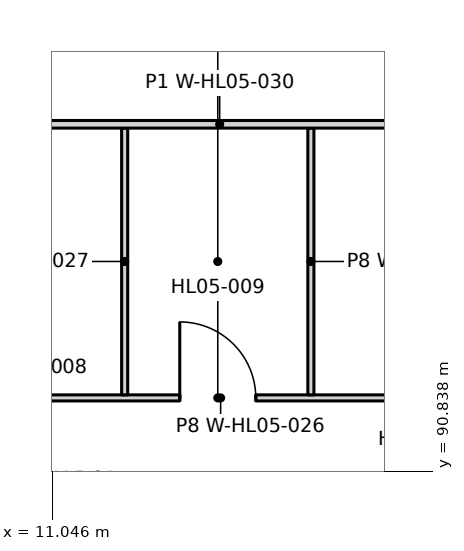
"""IFC4 building model, lengths in metres.
Left out: names, types, materials, properties, quantities, classifications, styles, units other than length and angle.
Written with IfcOpenShell. Run it as: python <this file> out.ifc"""

import sys

from ifc_helpers import new_model, si_unit, direction, frame, frame_2d, origin, place, context, subcontext, project, spatial, rectangle, extrude, element, fill, save


model = new_model("IFC4")
c1 = context("Model", 3, precision=1e-05, world=origin(), true_north=direction((0.0, 1.0)))
c2 = subcontext(c1, "Body", "Model", "MODEL_VIEW")
j1 = project(units=[si_unit("LENGTHUNIT", "METRE"), si_unit("PLANEANGLEUNIT", "RADIAN")], contexts=[c1])
p1 = place(None, origin())
s1 = spatial("IfcSite", under=j1, at=p1, CompositionType="ELEMENT")
p2 = place(p1, origin())
s2 = spatial("IfcBuilding", under=s1, at=p2, CompositionType="ELEMENT")
p3 = place(p2, frame((0.0, 0.0, 24.0)))
s3 = spatial("IfcBuildingStorey", under=s2, at=p3, CompositionType="ELEMENT", Elevation=24.0)
p4 = place(p3, frame((9.05, 91.8, 0.0), z_axis=(0.0, 0.0, 1.0), x_axis=(1.0, 0.0, 0.0)))
e1 = element("IfcWall", 1, at=p4, inside=s3, PredefinedType="PARTITIONING", context=c2, shape_type="SweptSolid", body=[
    extrude(rectangle(XDim=8.425, YDim=0.08, at=frame_2d((4.212, 0.0))), origin(), (0.0, 0.0, 1.0), 4.2),
])
p5 = place(p4, frame((0.95, 0.0, 0.0)))
e2 = element("IfcOpeningElement", 2, at=p5, cuts=e1, PredefinedType="OPENING", context=c2, shape_type="SweptSolid", body=[
    extrude(rectangle(XDim=1.0, YDim=2.1, at=frame_2d((0.5, 1.05))), frame((0.0, 0.05, 0.0), z_axis=(0.0, -1.0, 0.0), x_axis=(1.0, 0.0, 0.0)), (0.0, 0.0, 1.0), 0.1),
])
p6 = place(p4, frame((3.675, 0.0, 0.0)))
e3 = element("IfcOpeningElement", 3, at=p6, cuts=e1, PredefinedType="OPENING", context=c2, shape_type="SweptSolid", body=[
    extrude(rectangle(XDim=1.0, YDim=2.1, at=frame_2d((0.5, 1.05))), frame((0.0, 0.05, 0.0), z_axis=(0.0, -1.0, 0.0), x_axis=(1.0, 0.0, 0.0)), (0.0, 0.0, 1.0), 0.1),
])
p7 = place(p4, frame((6.4, 0.0, 0.0)))
e4 = element("IfcOpeningElement", 4, at=p7, cuts=e1, PredefinedType="OPENING", context=c2, shape_type="SweptSolid", body=[
    extrude(rectangle(XDim=1.0, YDim=2.1, at=frame_2d((0.5, 1.05))), frame((0.0, 0.05, 0.0), z_axis=(0.0, -1.0, 0.0), x_axis=(1.0, 0.0, 0.0)), (0.0, 0.0, 1.0), 0.1),
])
for number, where, z_axis, x_axis in (
    (5, (12.0, 91.84, 0.0), (0.0, 0.0, 1.0), (0.0, 1.0, 0.0)),
    (6, (14.45, 91.84, 0.0), (0.0, 0.0, 1.0), (0.0, 1.0, 0.0)),
):
    element("IfcWall", number, at=place(p3, frame(where, z_axis=z_axis, x_axis=x_axis)), inside=s3, PredefinedType="PARTITIONING", context=c2, shape_type="SweptSolid", body=[
        extrude(rectangle(XDim=3.51, YDim=0.08, at=frame_2d((1.755, 0.0))), origin(), (0.0, 0.0, 1.0), 4.2),
    ])
p8 = place(p3, frame((8.95, 95.4, 0.0), z_axis=(0.0, 0.0, 1.0), x_axis=(1.0, 0.0, 0.0)))
e7 = element("IfcWall", 7, at=p8, inside=s3, PredefinedType="PARTITIONING", context=c2, shape_type="SweptSolid", body=[
    extrude(rectangle(XDim=8.6, YDim=0.1, at=frame_2d((4.3, 0.0))), origin(), (0.0, 0.0, 1.0), 4.2),
])
p9 = place(p6, origin())
e8 = element("IfcDoor", 8, at=p9, inside=s3, OperationType="SINGLE_SWING_LEFT", PredefinedType="DOOR", context=c2, shape_type="SweptSolid", body=[
    extrude(rectangle(XDim=1.0, YDim=2.1, at=frame_2d((0.5, 1.05))), frame((0.0, 0.025, 0.0), z_axis=(0.0, -1.0, 0.0), x_axis=(1.0, 0.0, 0.0)), (0.0, 0.0, 1.0), 0.05),
])
fill(e3, e8)
save(model, sys.argv[1])
